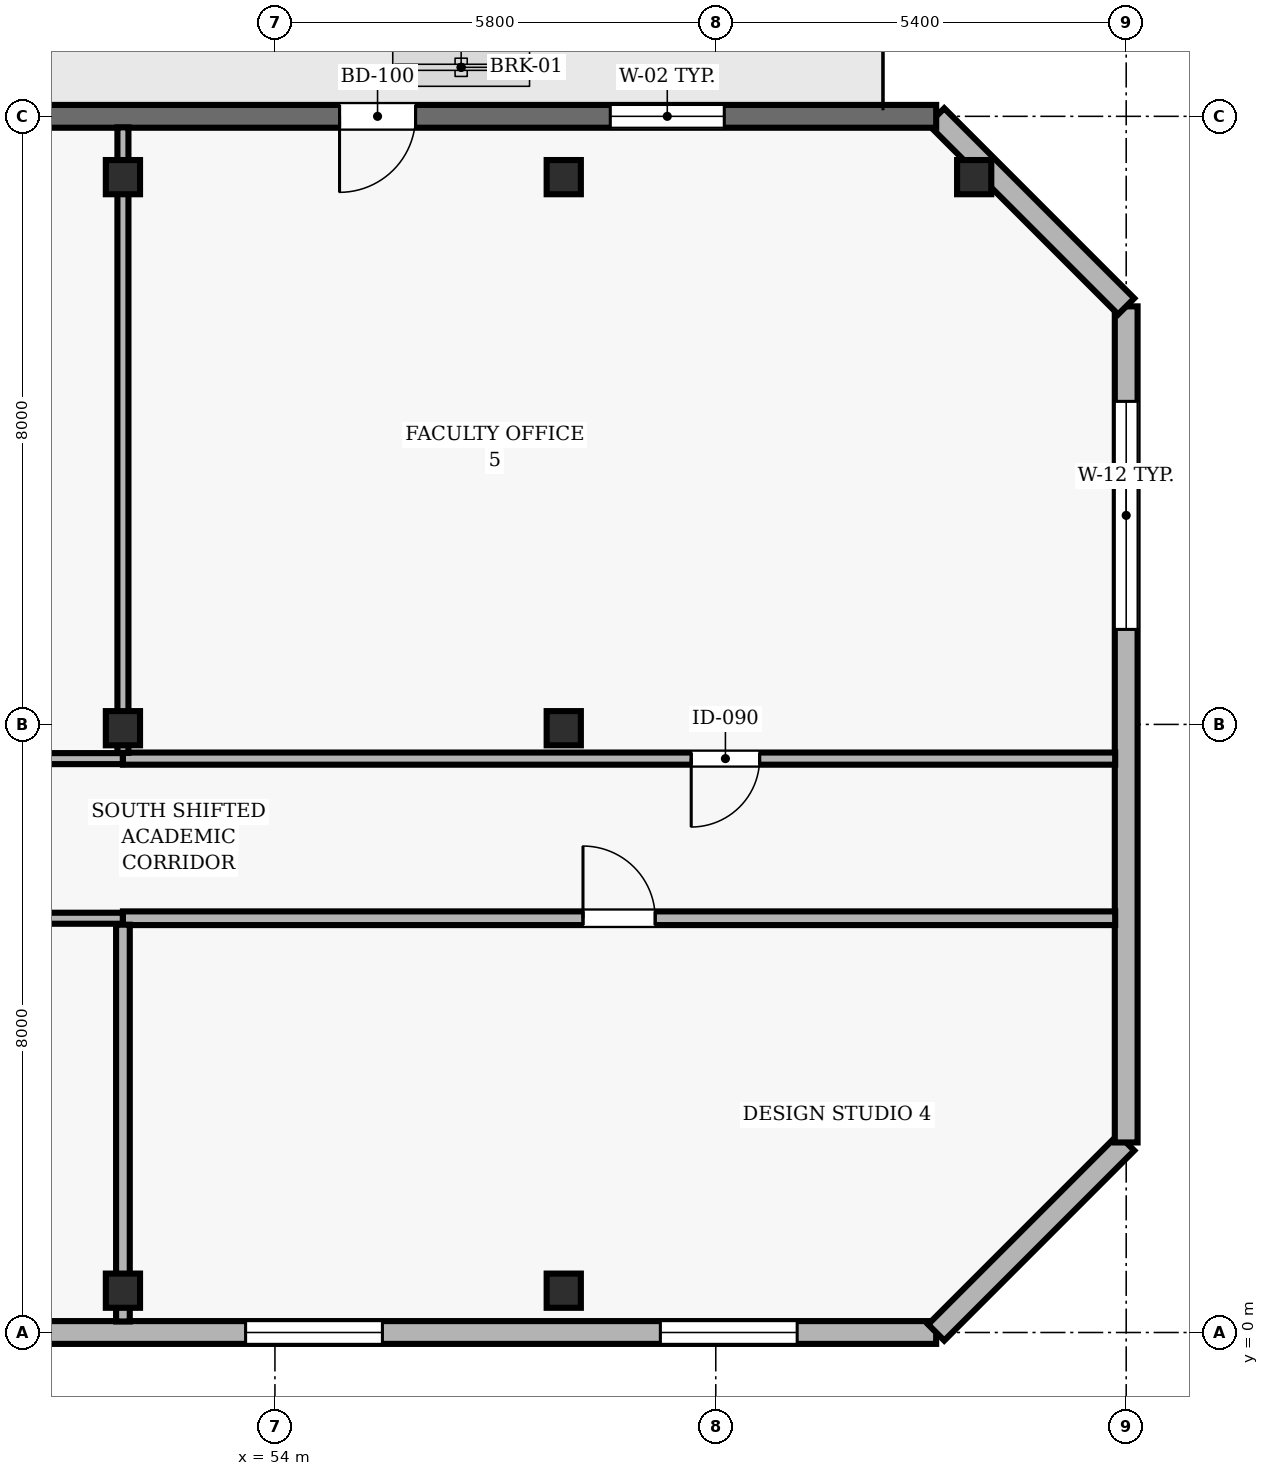
"""IFC4 building model, lengths in metres.
Left out: names, types, materials, properties, quantities, classifications, styles, units other than length and angle.
Written with IfcOpenShell. Run it as: python <this file> out.ifc"""

import sys

from ifc_helpers import new_model, si_unit, direction, frame, frame_2d, origin, origin_2d, place, context, subcontext, project, spatial, rectangle, hollow_rectangle, extrude, element, fill, save


model = new_model("IFC4")
c1 = context("Model", 3, precision=1e-05, world=origin(), true_north=direction((0.0, 1.0)))
c2 = subcontext(c1, "Body", "Model", "MODEL_VIEW")
j1 = project(units=[si_unit("LENGTHUNIT", "METRE"), si_unit("PLANEANGLEUNIT", "RADIAN")], contexts=[c1])
p1 = place(None, origin())
s1 = spatial("IfcSite", under=j1, at=p1, CompositionType="ELEMENT")
p2 = place(p1, origin())
s2 = spatial("IfcBuilding", under=s1, at=p2, CompositionType="ELEMENT")
p3 = place(p2, frame((0.0, 0.0, 187.5)))
s3 = spatial("IfcBuildingStorey", under=s2, at=p3, CompositionType="ELEMENT", Elevation=187.5)
for number, where, z_axis, x_axis in (
    (1, (52.0, 0.55, 0.0), (0.0, 0.0, 1.0), (1.0, 0.0, 0.0)),
    (2, (52.0, 7.95, 0.0), (0.0, 0.0, 1.0), (1.0, 0.0, 0.0)),
    (3, (52.0, 15.2, 0.0), (0.0, 0.0, 1.0), (1.0, 0.0, 0.0)),
    (4, (57.8, 0.55, 0.0), (0.0, 0.0, 1.0), (1.0, 0.0, 0.0)),
    (5, (57.8, 7.95, 0.0), (0.0, 0.0, 1.0), (1.0, 0.0, 0.0)),
    (6, (57.8, 15.2, 0.0), (0.0, 0.0, 1.0), (1.0, 0.0, 0.0)),
    (7, (63.2, 15.2, 0.0), (0.0, 0.0, 1.0), (1.0, 0.0, 0.0)),
):
    element("IfcColumn", number, at=place(p3, frame(where, z_axis=z_axis, x_axis=x_axis)), inside=s3, PredefinedType="COLUMN", context=c2, shape_type="SweptSolid", body=[
        extrude(hollow_rectangle(XDim=0.45, YDim=0.45, WallThickness=0.02, at=origin_2d()), origin(), (0.0, 0.0, 1.0), 3.9),
    ])
p4 = place(p3, frame((24.5, 0.0, 0.0), z_axis=(0.0, 0.0, 1.0), x_axis=(1.0, 0.0, 0.0)))
e8 = element("IfcWall", 8, at=p4, inside=s3, PredefinedType="SOLIDWALL", context=c2, shape_type="SweptSolid", body=[
    extrude(rectangle(XDim=38.2, YDim=0.3, at=frame_2d((19.1, 0.0))), origin(), (0.0, 0.0, 1.0), 3.69),
])
p5 = place(p4, frame((1.829, 0.0, 0.9)))
e9 = element("IfcOpeningElement", 9, at=p5, cuts=e8, PredefinedType="OPENING", context=c2, shape_type="SweptSolid", body=[
    extrude(rectangle(XDim=1.8, YDim=2.2, at=frame_2d((0.9, 1.1))), frame((0.0, 0.16, 0.0), z_axis=(0.0, -1.0, 0.0), x_axis=(1.0, 0.0, 0.0)), (0.0, 0.0, 1.0), 0.32),
])
p6 = place(p4, frame((8.186, 0.0, 0.9)))
e10 = element("IfcOpeningElement", 10, at=p6, cuts=e8, PredefinedType="OPENING", context=c2, shape_type="SweptSolid", body=[
    extrude(rectangle(XDim=1.8, YDim=2.2, at=frame_2d((0.9, 1.1))), frame((0.0, 0.16, 0.0), z_axis=(0.0, -1.0, 0.0), x_axis=(1.0, 0.0, 0.0)), (0.0, 0.0, 1.0), 0.32),
])
p7 = place(p4, frame((18.2, 0.0, 0.9)))
e11 = element("IfcOpeningElement", 11, at=p7, cuts=e8, PredefinedType="OPENING", context=c2, shape_type="SweptSolid", body=[
    extrude(rectangle(XDim=1.8, YDim=2.2, at=frame_2d((0.9, 1.1))), frame((0.0, 0.16, 0.0), z_axis=(0.0, -1.0, 0.0), x_axis=(1.0, 0.0, 0.0)), (0.0, 0.0, 1.0), 0.32),
])
p8 = place(p4, frame((23.657, 0.0, 0.9)))
e12 = element("IfcOpeningElement", 12, at=p8, cuts=e8, PredefinedType="OPENING", context=c2, shape_type="SweptSolid", body=[
    extrude(rectangle(XDim=1.8, YDim=2.2, at=frame_2d((0.9, 1.1))), frame((0.0, 0.16, 0.0), z_axis=(0.0, -1.0, 0.0), x_axis=(1.0, 0.0, 0.0)), (0.0, 0.0, 1.0), 0.32),
])
p9 = place(p4, frame((29.114, 0.0, 0.9)))
e13 = element("IfcOpeningElement", 13, at=p9, cuts=e8, PredefinedType="OPENING", context=c2, shape_type="SweptSolid", body=[
    extrude(rectangle(XDim=1.8, YDim=2.2, at=frame_2d((0.9, 1.1))), frame((0.0, 0.16, 0.0), z_axis=(0.0, -1.0, 0.0), x_axis=(1.0, 0.0, 0.0)), (0.0, 0.0, 1.0), 0.32),
])
p10 = place(p4, frame((34.571, 0.0, 0.9)))
e14 = element("IfcOpeningElement", 14, at=p10, cuts=e8, PredefinedType="OPENING", context=c2, shape_type="SweptSolid", body=[
    extrude(rectangle(XDim=1.8, YDim=2.2, at=frame_2d((0.9, 1.1))), frame((0.0, 0.16, 0.0), z_axis=(0.0, -1.0, 0.0), x_axis=(1.0, 0.0, 0.0)), (0.0, 0.0, 1.0), 0.32),
])
p11 = place(p3, frame((62.7, 0.0, 0.0), z_axis=(0.0, 0.0, 1.0), x_axis=(0.707106781187, 0.707106781187, 0.0)))
e15 = element("IfcWall", 15, at=p11, inside=s3, PredefinedType="SOLIDWALL", context=c2, shape_type="SweptSolid", body=[
    extrude(rectangle(XDim=3.536, YDim=0.3, at=frame_2d((1.768, 0.0))), origin(), (0.0, 0.0, 1.0), 3.69),
])
p12 = place(p3, frame((65.2, 2.5, 0.0), z_axis=(0.0, 0.0, 1.0), x_axis=(0.0, 1.0, 0.0)))
e16 = element("IfcWall", 16, at=p12, inside=s3, PredefinedType="SOLIDWALL", context=c2, shape_type="SweptSolid", body=[
    extrude(rectangle(XDim=11.0, YDim=0.3, at=frame_2d((5.5, 0.0))), origin(), (0.0, 0.0, 1.0), 3.69),
])
p13 = place(p12, frame((6.75, 0.0, 0.9)))
e17 = element("IfcOpeningElement", 17, at=p13, cuts=e16, PredefinedType="OPENING", context=c2, shape_type="SweptSolid", body=[
    extrude(rectangle(XDim=3.0, YDim=2.2, at=frame_2d((1.5, 1.1))), frame((0.0, 0.16, 0.0), z_axis=(0.0, -1.0, 0.0), x_axis=(1.0, 0.0, 0.0)), (0.0, 0.0, 1.0), 0.32),
])
p14 = place(p3, frame((65.2, 13.5, 0.0), z_axis=(0.0, 0.0, 1.0), x_axis=(-0.707106781187, 0.707106781187, 0.0)))
e18 = element("IfcWall", 18, at=p14, inside=s3, PredefinedType="SOLIDWALL", context=c2, shape_type="SweptSolid", body=[
    extrude(rectangle(XDim=3.536, YDim=0.3, at=frame_2d((1.768, 0.0))), origin(), (0.0, 0.0, 1.0), 3.69),
])
p15 = place(p3, frame((62.7, 16.0, 0.0), z_axis=(0.0, 0.0, 1.0), x_axis=(-1.0, 0.0, 0.0)))
e19 = element("IfcWall", 19, at=p15, inside=s3, PredefinedType="SOLIDWALL", context=c2, shape_type="SweptSolid", body=[
    extrude(rectangle(XDim=14.15, YDim=0.3, at=frame_2d((7.075, 0.0))), origin(), (0.0, 0.0, 1.0), 3.69),
])
p16 = place(p15, frame((6.85, 0.0, 0.0)))
e20 = element("IfcOpeningElement", 20, at=p16, cuts=e19, PredefinedType="OPENING", context=c2, shape_type="SweptSolid", body=[
    extrude(rectangle(XDim=1.0, YDim=2.2, at=frame_2d((0.5, 1.1))), frame((0.0, 0.16, 0.0), z_axis=(0.0, -1.0, 0.0), x_axis=(1.0, 0.0, 0.0)), (0.0, 0.0, 1.0), 0.32),
])
p17 = place(p15, frame((12.225, 0.0, 0.0)))
e21 = element("IfcOpeningElement", 21, at=p17, cuts=e19, PredefinedType="OPENING", context=c2, shape_type="SweptSolid", body=[
    extrude(rectangle(XDim=1.35, YDim=2.2, at=frame_2d((0.675, 1.1))), frame((0.0, 0.16, 0.0), z_axis=(0.0, -1.0, 0.0), x_axis=(1.0, 0.0, 0.0)), (0.0, 0.0, 1.0), 0.32),
])
p18 = place(p15, frame((2.788, 0.0, 0.9)))
e22 = element("IfcOpeningElement", 22, at=p18, cuts=e19, PredefinedType="OPENING", context=c2, shape_type="SweptSolid", body=[
    extrude(rectangle(XDim=1.5, YDim=1.6, at=frame_2d((0.75, 0.8))), frame((0.0, 0.16, 0.0), z_axis=(0.0, -1.0, 0.0), x_axis=(1.0, 0.0, 0.0)), (0.0, 0.0, 1.0), 0.32),
])
p19 = place(p3, frame((40.35, 5.45, 0.0), z_axis=(0.0, 0.0, 1.0), x_axis=(1.0, 0.0, 0.0)))
e23 = element("IfcWall", 23, at=p19, inside=s3, PredefinedType="PARTITIONING", context=c2, shape_type="SweptSolid", body=[
    extrude(rectangle(XDim=11.65, YDim=0.145, at=frame_2d((5.825, 0.0))), origin(), (0.0, 0.0, 1.0), 3.372),
])
p20 = place(p19, frame((5.275, 0.0, 0.0)))
e24 = element("IfcOpeningElement", 24, at=p20, cuts=e23, PredefinedType="OPENING", context=c2, shape_type="SweptSolid", body=[
    extrude(rectangle(XDim=1.1, YDim=2.15, at=frame_2d((0.55, 1.075))), frame((0.0, 0.083, 0.0), z_axis=(0.0, -1.0, 0.0), x_axis=(1.0, 0.0, 0.0)), (0.0, 0.0, 1.0), 0.165),
])
p21 = place(p3, frame((52.0, 5.45, 0.0), z_axis=(0.0, 0.0, 1.0), x_axis=(1.0, 0.0, 0.0)))
e25 = element("IfcWall", 25, at=p21, inside=s3, PredefinedType="PARTITIONING", context=c2, shape_type="SweptSolid", body=[
    extrude(rectangle(XDim=13.055, YDim=0.18, at=frame_2d((6.527, 0.0))), origin(), (0.0, 0.0, 1.0), 3.372),
])
p22 = place(p21, frame((6.053, 0.0, 0.0)))
e26 = element("IfcOpeningElement", 26, at=p22, cuts=e25, PredefinedType="OPENING", context=c2, shape_type="SweptSolid", body=[
    extrude(rectangle(XDim=0.95, YDim=2.1, at=frame_2d((0.475, 1.05))), frame((0.0, 0.1, 0.0), z_axis=(0.0, -1.0, 0.0), x_axis=(1.0, 0.0, 0.0)), (0.0, 0.0, 1.0), 0.2),
])
p23 = place(p3, frame((52.0, 7.55, 0.0), z_axis=(0.0, 0.0, 1.0), x_axis=(-1.0, 0.0, 0.0)))
e27 = element("IfcWall", 27, at=p23, inside=s3, PredefinedType="PARTITIONING", context=c2, shape_type="SweptSolid", body=[
    extrude(rectangle(XDim=11.65, YDim=0.145, at=frame_2d((5.825, 0.0))), origin(), (0.0, 0.0, 1.0), 3.146),
])
p24 = place(p23, frame((3.175, 0.0, 0.0)))
e28 = element("IfcOpeningElement", 28, at=p24, cuts=e27, PredefinedType="OPENING", context=c2, shape_type="SweptSolid", body=[
    extrude(rectangle(XDim=1.1, YDim=2.15, at=frame_2d((0.55, 1.075))), frame((0.0, 0.083, 0.0), z_axis=(0.0, -1.0, 0.0), x_axis=(1.0, 0.0, 0.0)), (0.0, 0.0, 1.0), 0.165),
])
p25 = place(p3, frame((65.055, 7.55, 0.0), z_axis=(0.0, 0.0, 1.0), x_axis=(-1.0, 0.0, 0.0)))
e29 = element("IfcWall", 29, at=p25, inside=s3, PredefinedType="PARTITIONING", context=c2, shape_type="SweptSolid", body=[
    extrude(rectangle(XDim=13.055, YDim=0.16, at=frame_2d((6.527, 0.0))), origin(), (0.0, 0.0, 1.0), 3.146),
])
p26 = place(p25, frame((4.678, 0.0, 0.0)))
e30 = element("IfcOpeningElement", 30, at=p26, cuts=e29, PredefinedType="OPENING", context=c2, shape_type="SweptSolid", body=[
    extrude(rectangle(XDim=0.9, YDim=2.1, at=frame_2d((0.45, 1.05))), frame((0.0, 0.09, 0.0), z_axis=(0.0, -1.0, 0.0), x_axis=(1.0, 0.0, 0.0)), (0.0, 0.0, 1.0), 0.18),
])
p27 = place(p3, frame((52.0, 0.145, 0.0), z_axis=(0.0, 0.0, 1.0), x_axis=(0.0, 1.0, 0.0)))
e31 = element("IfcWall", 31, at=p27, inside=s3, PredefinedType="PARTITIONING", context=c2, shape_type="SweptSolid", body=[
    extrude(rectangle(XDim=5.22, YDim=0.18, at=frame_2d((2.61, 0.0))), origin(), (0.0, 0.0, 1.0), 3.146),
])
p28 = place(p3, frame((52.0, 7.625, 0.0), z_axis=(0.0, 0.0, 1.0), x_axis=(0.0, 1.0, 0.0)))
e32 = element("IfcWall", 32, at=p28, inside=s3, PredefinedType="PARTITIONING", context=c2, shape_type="SweptSolid", body=[
    extrude(rectangle(XDim=8.23, YDim=0.145, at=frame_2d((4.115, 0.0))), origin(), (0.0, 0.0, 1.0), 3.146),
])
p29 = place(p9, origin())
e33 = element("IfcWindow", 33, at=p29, inside=s3, PartitioningType="SINGLE_PANEL", PredefinedType="WINDOW", context=c2, shape_type="SweptSolid", body=[
    extrude(rectangle(XDim=1.8, YDim=2.2, at=frame_2d((0.9, 1.1))), frame((0.0, 0.03, 0.0), z_axis=(0.0, -1.0, 0.0), x_axis=(1.0, 0.0, 0.0)), (0.0, 0.0, 1.0), 0.06),
])
fill(e13, e33)
p30 = place(p10, origin())
e34 = element("IfcWindow", 34, at=p30, inside=s3, PartitioningType="SINGLE_PANEL", PredefinedType="WINDOW", context=c2, shape_type="SweptSolid", body=[
    extrude(rectangle(XDim=1.8, YDim=2.2, at=frame_2d((0.9, 1.1))), frame((0.0, 0.03, 0.0), z_axis=(0.0, -1.0, 0.0), x_axis=(1.0, 0.0, 0.0)), (0.0, 0.0, 1.0), 0.06),
])
fill(e14, e34)
p31 = place(p13, origin())
e35 = element("IfcWindow", 35, at=p31, inside=s3, PartitioningType="SINGLE_PANEL", PredefinedType="WINDOW", context=c2, shape_type="SweptSolid", body=[
    extrude(rectangle(XDim=3.0, YDim=2.2, at=frame_2d((1.5, 1.1))), frame((0.0, 0.03, 0.0), z_axis=(0.0, -1.0, 0.0), x_axis=(1.0, 0.0, 0.0)), (0.0, 0.0, 1.0), 0.06),
])
fill(e17, e35)
p32 = place(p16, origin())
e36 = element("IfcDoor", 36, at=p32, inside=s3, OperationType="SINGLE_SWING_RIGHT", PredefinedType="DOOR", context=c2, shape_type="SweptSolid", body=[
    extrude(rectangle(XDim=1.0, YDim=2.2, at=frame_2d((0.5, 1.1))), frame((0.0, 0.025, 0.0), z_axis=(0.0, -1.0, 0.0), x_axis=(1.0, 0.0, 0.0)), (0.0, 0.0, 1.0), 0.05),
])
fill(e20, e36)
p33 = place(p18, origin())
e37 = element("IfcWindow", 37, at=p33, inside=s3, PartitioningType="SINGLE_PANEL", PredefinedType="WINDOW", context=c2, shape_type="SweptSolid", body=[
    extrude(rectangle(XDim=1.5, YDim=1.6, at=frame_2d((0.75, 0.8))), frame((0.0, 0.03, 0.0), z_axis=(0.0, -1.0, 0.0), x_axis=(1.0, 0.0, 0.0)), (0.0, 0.0, 1.0), 0.06),
])
fill(e22, e37)
p34 = place(p22, origin())
e38 = element("IfcDoor", 38, at=p34, inside=s3, OperationType="SINGLE_SWING_LEFT", PredefinedType="DOOR", context=c2, shape_type="SweptSolid", body=[
    extrude(rectangle(XDim=0.95, YDim=2.1, at=frame_2d((0.475, 1.05))), frame((0.0, 0.025, 0.0), z_axis=(0.0, -1.0, 0.0), x_axis=(1.0, 0.0, 0.0)), (0.0, 0.0, 1.0), 0.05),
])
fill(e26, e38)
p35 = place(p26, origin())
e39 = element("IfcDoor", 39, at=p35, inside=s3, OperationType="SINGLE_SWING_RIGHT", PredefinedType="DOOR", context=c2, shape_type="SweptSolid", body=[
    extrude(rectangle(XDim=0.9, YDim=2.1, at=frame_2d((0.45, 1.05))), frame((0.0, 0.025, 0.0), z_axis=(0.0, -1.0, 0.0), x_axis=(1.0, 0.0, 0.0)), (0.0, 0.0, 1.0), 0.05),
])
fill(e30, e39)
save(model, sys.argv[1])
